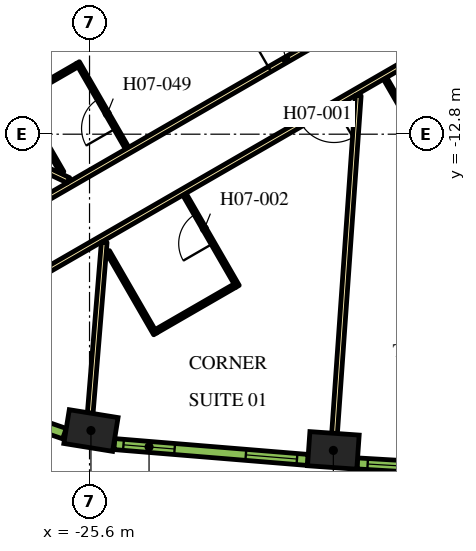
"""IFC4 building model, lengths in metres.
Left out: names, types, materials, properties, quantities, classifications, styles, units other than length and angle.
Written with IfcOpenShell. Run it as: python <this file> out.ifc"""

import sys

from ifc_helpers import new_model, si_unit, direction, frame, frame_2d, origin, origin_2d, place, context, subcontext, project, spatial, rectangle, extrude, element, fill, save


model = new_model("IFC4")
c1 = context("Model", 3, precision=1e-05, world=origin(), true_north=direction((0.0, 1.0)))
c2 = subcontext(c1, "Body", "Model", "MODEL_VIEW")
j1 = project(units=[si_unit("LENGTHUNIT", "METRE"), si_unit("PLANEANGLEUNIT", "RADIAN")], contexts=[c1])
p1 = place(None, origin())
s1 = spatial("IfcSite", under=j1, at=p1, CompositionType="ELEMENT")
p2 = place(p1, origin())
s2 = spatial("IfcBuilding", under=s1, at=p2, CompositionType="ELEMENT")
p3 = place(p2, frame((0.0, 0.0, 95.4)))
s3 = spatial("IfcBuildingStorey", under=s2, at=p3, CompositionType="ELEMENT", Elevation=95.4)
for number, where, z_axis, x_axis in (
    (1, (-25.563, -20.597, 0.0), (0.0, 0.0, 1.0), (0.987, -0.159, 0.0)),
    (2, (-19.184, -21.12, 0.0), (0.0, 0.0, 1.0), (0.998, -0.07, 0.0)),
):
    element("IfcColumn", number, at=place(p3, frame(where, z_axis=z_axis, x_axis=x_axis)), inside=s3, PredefinedType="COLUMN", context=c2, shape_type="SweptSolid", body=[
        extrude(rectangle(XDim=1.3, YDim=0.9, at=origin_2d()), origin(), (0.0, 0.0, 1.0), 3.9),
    ])
p4 = place(p3, frame((-28.211, -15.335, 0.0), z_axis=(0.0, 0.0, 1.0), x_axis=(0.866025884867, 0.49999916674, 0.0)))
e3 = element("IfcWall", 3, at=p4, inside=s3, PredefinedType="PARTITIONING", context=c2, shape_type="SweptSolid", body=[
    extrude(rectangle(XDim=13.543, YDim=0.15, at=frame_2d((6.772, 0.0))), origin(), (0.0, 0.0, 1.0), 2.75),
])
p5 = place(p4, frame((8.488, 0.0, 0.0)))
e4 = element("IfcOpeningElement", 4, at=p5, cuts=e3, PredefinedType="OPENING", context=c2, shape_type="SweptSolid", body=[
    extrude(rectangle(XDim=1.0, YDim=2.1, at=frame_2d((0.5, 1.05))), frame((0.0, 0.085, 0.0), z_axis=(0.0, -1.0, 0.0), x_axis=(1.0, 0.0, 0.0)), (0.0, 0.0, 1.0), 0.17),
])
p6 = place(p3, frame((-15.587, -9.952, 0.0), z_axis=(0.0, 0.0, 1.0), x_axis=(-0.866017869832, -0.500013048961, 0.0)))
e5 = element("IfcWall", 5, at=p6, inside=s3, PredefinedType="PARTITIONING", context=c2, shape_type="SweptSolid", body=[
    extrude(rectangle(XDim=13.624, YDim=0.15, at=frame_2d((6.812, 0.0))), origin(), (0.0, 0.0, 1.0), 2.75),
])
p7 = place(p6, frame((4.134, 0.0, 0.0)))
e6 = element("IfcOpeningElement", 6, at=p7, cuts=e5, PredefinedType="OPENING", context=c2, shape_type="SweptSolid", body=[
    extrude(rectangle(XDim=1.0, YDim=2.1, at=frame_2d((0.5, 1.05))), frame((0.0, 0.085, 0.0), z_axis=(0.0, -1.0, 0.0), x_axis=(1.0, 0.0, 0.0)), (0.0, 0.0, 1.0), 0.17),
])
p8 = place(p3, frame((-30.231, -12.085, 0.0), z_axis=(0.0, 0.0, 1.0), x_axis=(0.904001132572, -0.427530060122, 0.0)))
e7 = element("IfcWall", 7, at=p8, inside=s3, PredefinedType="PARTITIONING", context=c2, shape_type="SweptSolid", body=[
    extrude(rectangle(XDim=4.51, YDim=0.15, at=frame_2d((2.255, 0.0))), origin(), (0.0, 0.0, 1.0), 2.75),
])
p9 = place(p3, frame((-25.582, -20.138, 0.0), z_axis=(0.0, 0.0, 1.0), x_axis=(0.081746132986, 0.996653184283, 0.0)))
e8 = element("IfcWall", 8, at=p9, inside=s3, PredefinedType="PARTITIONING", context=c2, shape_type="SweptSolid", body=[
    extrude(rectangle(XDim=4.51, YDim=0.15, at=frame_2d((2.255, 0.0))), origin(), (0.0, 0.0, 1.0), 2.75),
])
p10 = place(p3, frame((-19.153, -20.671, 0.0), z_axis=(0.0, 0.0, 1.0), x_axis=(0.070070736723, 0.997542025107, 0.0)))
e9 = element("IfcWall", 9, at=p10, inside=s3, PredefinedType="PARTITIONING", context=c2, shape_type="SweptSolid", body=[
    extrude(rectangle(XDim=8.909, YDim=0.15, at=frame_2d((4.455, 0.0))), origin(), (0.0, 0.0, 1.0), 2.75),
])
p11 = place(p3, frame((-21.704, -16.803, 0.0), z_axis=(0.0, 0.0, 1.0), x_axis=(-0.500049511043, 0.865996816683, 0.0)))
e10 = element("IfcWall", 10, at=p11, inside=s3, PredefinedType="PARTITIONING", context=c2, shape_type="SweptSolid", body=[
    extrude(rectangle(XDim=2.8, YDim=0.1, at=frame_2d((1.4, 0.0))), origin(), (0.0, 0.0, 1.0), 2.75),
])
p12 = place(p11, frame((1.3, 0.0, 0.0)))
e11 = element("IfcOpeningElement", 11, at=p12, cuts=e10, PredefinedType="OPENING", context=c2, shape_type="SweptSolid", body=[
    extrude(rectangle(XDim=0.9, YDim=2.1, at=frame_2d((0.45, 1.05))), frame((0.0, 0.06, 0.0), z_axis=(0.0, -1.0, 0.0), x_axis=(1.0, 0.0, 0.0)), (0.0, 0.0, 1.0), 0.12),
])
p13 = place(p3, frame((-21.772, -16.785, 0.0), z_axis=(0.0, 0.0, 1.0), x_axis=(-0.866024647952, -0.500001309137, 0.0)))
e12 = element("IfcWall", 12, at=p13, inside=s3, PredefinedType="PARTITIONING", context=c2, shape_type="SweptSolid", body=[
    extrude(rectangle(XDim=2.4, YDim=0.1, at=frame_2d((1.2, 0.0))), origin(), (0.0, 0.0, 1.0), 2.75),
])
p14 = place(p3, frame((-25.119, -15.888, 0.0), z_axis=(0.0, 0.0, 1.0), x_axis=(0.500046524342, -0.865998541277, 0.0)))
e13 = element("IfcWall", 13, at=p14, inside=s3, PredefinedType="PARTITIONING", context=c2, shape_type="SweptSolid", body=[
    extrude(rectangle(XDim=2.5, YDim=0.1, at=frame_2d((1.25, 0.0))), origin(), (0.0, 0.0, 1.0), 2.75),
])
p15 = place(p3, frame((-16.956, -12.832, 0.0), z_axis=(0.0, 0.0, 1.0), x_axis=(-0.499978980201, 0.866037539231, 0.0)))
e14 = element("IfcWall", 14, at=p15, inside=s3, PredefinedType="PARTITIONING", context=c2, shape_type="SweptSolid", body=[
    extrude(rectangle(XDim=1.73, YDim=0.1, at=frame_2d((0.865, 0.0))), origin(), (0.0, 0.0, 1.0), 2.75),
])
p16 = place(p3, frame((-24.61, -13.169, 0.0), z_axis=(0.0, 0.0, 1.0), x_axis=(-0.500006934395, 0.866021400173, 0.0)))
e15 = element("IfcWall", 15, at=p16, inside=s3, PredefinedType="PARTITIONING", context=c2, shape_type="SweptSolid", body=[
    extrude(rectangle(XDim=2.6, YDim=0.1, at=frame_2d((1.3, 0.0))), origin(), (0.0, 0.0, 1.0), 2.75),
])
p17 = place(p16, frame((0.6, 0.0, 0.0)))
e16 = element("IfcOpeningElement", 16, at=p17, cuts=e15, PredefinedType="OPENING", context=c2, shape_type="SweptSolid", body=[
    extrude(rectangle(XDim=0.9, YDim=2.1, at=frame_2d((0.45, 1.05))), frame((0.0, 0.06, 0.0), z_axis=(0.0, -1.0, 0.0), x_axis=(1.0, 0.0, 0.0)), (0.0, 0.0, 1.0), 0.12),
])
p18 = place(p3, frame((-25.928, -10.986, 0.0), z_axis=(0.0, 0.0, 1.0), x_axis=(-0.865989465428, -0.500062241894, 0.0)))
e17 = element("IfcWall", 17, at=p18, inside=s3, PredefinedType="PARTITIONING", context=c2, shape_type="SweptSolid", body=[
    extrude(rectangle(XDim=1.7, YDim=0.1, at=frame_2d((0.85, 0.0))), origin(), (0.0, 0.0, 1.0), 2.75),
])
p19 = place(p3, frame((-26.319, -13.81, 0.0), z_axis=(0.0, 0.0, 1.0), x_axis=(-0.499952165731, 0.866053019151, 0.0)))
e18 = element("IfcWall", 18, at=p19, inside=s3, PredefinedType="PARTITIONING", context=c2, shape_type="SweptSolid", body=[
    extrude(rectangle(XDim=2.3, YDim=0.1, at=frame_2d((1.15, 0.0))), origin(), (0.0, 0.0, 1.0), 2.75),
])
p20 = place(p3, frame((-24.946, -20.954, 0.0), z_axis=(0.0, 0.0, 1.0), x_axis=(0.99665273362, -0.081751627308, 0.0)))
e19 = element("IfcWall", 19, at=p20, inside=s3, PredefinedType="SOLIDWALL", context=c2, shape_type="SweptSolid", body=[
    extrude(rectangle(XDim=5.107, YDim=0.29, at=frame_2d((2.553, 0.0))), origin(), (0.0, 0.0, 1.0), 3.65),
])
p21 = place(p20, frame((0.24, 0.0, 0.9)))
e20 = element("IfcOpeningElement", 20, at=p21, cuts=e19, PredefinedType="OPENING", context=c2, shape_type="SweptSolid", body=[
    extrude(rectangle(XDim=1.35, YDim=2.15, at=frame_2d((0.675, 1.075))), frame((0.0, 0.155, 0.0), z_axis=(0.0, -1.0, 0.0), x_axis=(1.0, 0.0, 0.0)), (0.0, 0.0, 1.0), 0.31),
])
p22 = place(p20, frame((3.471, 0.0, 0.9)))
e21 = element("IfcOpeningElement", 21, at=p22, cuts=e19, PredefinedType="OPENING", context=c2, shape_type="SweptSolid", body=[
    extrude(rectangle(XDim=1.35, YDim=2.15, at=frame_2d((0.675, 1.075))), frame((0.0, 0.155, 0.0), z_axis=(0.0, -1.0, 0.0), x_axis=(1.0, 0.0, 0.0)), (0.0, 0.0, 1.0), 0.31),
])
p23 = place(p3, frame((-18.553, -21.463, 0.0), z_axis=(0.0, 0.0, 1.0), x_axis=(0.998290511436, -0.058447025388, 0.0)))
e22 = element("IfcWall", 22, at=p23, inside=s3, PredefinedType="SOLIDWALL", context=c2, shape_type="SweptSolid", body=[
    extrude(rectangle(XDim=5.1, YDim=0.29, at=frame_2d((2.55, 0.0))), origin(), (0.0, 0.0, 1.0), 3.65),
])
p24 = place(p23, frame((0.273, 0.0, 0.9)))
e23 = element("IfcOpeningElement", 23, at=p24, cuts=e22, PredefinedType="OPENING", context=c2, shape_type="SweptSolid", body=[
    extrude(rectangle(XDim=1.35, YDim=2.15, at=frame_2d((0.675, 1.075))), frame((0.0, 0.155, 0.0), z_axis=(0.0, -1.0, 0.0), x_axis=(1.0, 0.0, 0.0)), (0.0, 0.0, 1.0), 0.31),
])
p25 = place(p23, frame((3.478, 0.0, 0.9)))
e24 = element("IfcOpeningElement", 24, at=p25, cuts=e22, PredefinedType="OPENING", context=c2, shape_type="SweptSolid", body=[
    extrude(rectangle(XDim=1.35, YDim=2.15, at=frame_2d((0.675, 1.075))), frame((0.0, 0.155, 0.0), z_axis=(0.0, -1.0, 0.0), x_axis=(1.0, 0.0, 0.0)), (0.0, 0.0, 1.0), 0.31),
])
p26 = place(p3, frame((-27.981, -20.086, 0.0), z_axis=(0.0, 0.0, 1.0), x_axis=(0.945385815453, -0.325953462844, 0.0)))
e25 = element("IfcWall", 25, at=p26, inside=s3, PredefinedType="SOLIDWALL", context=c2, shape_type="SweptSolid", body=[
    extrude(rectangle(XDim=1.819, YDim=0.29, at=frame_2d((0.91, 0.0))), origin(), (0.0, 0.0, 1.0), 3.65),
])
p27 = place(p26, frame((0.46, 0.0, 0.9)))
e26 = element("IfcOpeningElement", 26, at=p27, cuts=e25, PredefinedType="OPENING", context=c2, shape_type="SweptSolid", body=[
    extrude(rectangle(XDim=0.9, YDim=2.15, at=frame_2d((0.45, 1.075))), frame((0.0, 0.155, 0.0), z_axis=(0.0, -1.0, 0.0), x_axis=(1.0, 0.0, 0.0)), (0.0, 0.0, 1.0), 0.31),
])
p28 = place(p7, origin())
e27 = element("IfcDoor", 27, at=p28, inside=s3, OperationType="SINGLE_SWING_LEFT", PredefinedType="DOOR", context=c2, shape_type="SweptSolid", body=[
    extrude(rectangle(XDim=1.0, YDim=2.1, at=frame_2d((0.5, 1.05))), frame((0.0, 0.025, 0.0), z_axis=(0.0, -1.0, 0.0), x_axis=(1.0, 0.0, 0.0)), (0.0, 0.0, 1.0), 0.05),
])
fill(e6, e27)
p29 = place(p12, origin())
e28 = element("IfcDoor", 28, at=p29, inside=s3, OperationType="SINGLE_SWING_LEFT", PredefinedType="DOOR", context=c2, shape_type="SweptSolid", body=[
    extrude(rectangle(XDim=0.9, YDim=2.1, at=frame_2d((0.45, 1.05))), frame((0.0, 0.025, 0.0), z_axis=(0.0, -1.0, 0.0), x_axis=(1.0, 0.0, 0.0)), (0.0, 0.0, 1.0), 0.05),
])
fill(e11, e28)
p30 = place(p5, origin())
e29 = element("IfcDoor", 29, at=p30, inside=s3, OperationType="SINGLE_SWING_RIGHT", PredefinedType="DOOR", context=c2, shape_type="SweptSolid", body=[
    extrude(rectangle(XDim=1.0, YDim=2.1, at=frame_2d((0.5, 1.05))), frame((0.0, 0.025, 0.0), z_axis=(0.0, -1.0, 0.0), x_axis=(1.0, 0.0, 0.0)), (0.0, 0.0, 1.0), 0.05),
])
fill(e4, e29)
p31 = place(p17, origin())
e30 = element("IfcDoor", 30, at=p31, inside=s3, OperationType="SINGLE_SWING_LEFT", PredefinedType="DOOR", context=c2, shape_type="SweptSolid", body=[
    extrude(rectangle(XDim=0.9, YDim=2.1, at=frame_2d((0.45, 1.05))), frame((0.0, 0.025, 0.0), z_axis=(0.0, -1.0, 0.0), x_axis=(1.0, 0.0, 0.0)), (0.0, 0.0, 1.0), 0.05),
])
fill(e16, e30)
p32 = place(p21, origin())
e31 = element("IfcWindow", 31, at=p32, inside=s3, PartitioningType="DOUBLE_PANEL_VERTICAL", PredefinedType="WINDOW", context=c2, shape_type="SweptSolid", body=[
    extrude(rectangle(XDim=1.35, YDim=2.15, at=frame_2d((0.675, 1.075))), frame((0.0, 0.015, 0.0), z_axis=(0.0, -1.0, 0.0), x_axis=(1.0, 0.0, 0.0)), (0.0, 0.0, 1.0), 0.06),
])
fill(e20, e31)
p33 = place(p22, origin())
e32 = element("IfcWindow", 32, at=p33, inside=s3, PartitioningType="DOUBLE_PANEL_VERTICAL", PredefinedType="WINDOW", context=c2, shape_type="SweptSolid", body=[
    extrude(rectangle(XDim=1.35, YDim=2.15, at=frame_2d((0.675, 1.075))), frame((0.0, 0.015, 0.0), z_axis=(0.0, -1.0, 0.0), x_axis=(1.0, 0.0, 0.0)), (0.0, 0.0, 1.0), 0.06),
])
fill(e21, e32)
p34 = place(p24, origin())
e33 = element("IfcWindow", 33, at=p34, inside=s3, PartitioningType="DOUBLE_PANEL_VERTICAL", PredefinedType="WINDOW", context=c2, shape_type="SweptSolid", body=[
    extrude(rectangle(XDim=1.35, YDim=2.15, at=frame_2d((0.675, 1.075))), frame((0.0, 0.015, 0.0), z_axis=(0.0, -1.0, 0.0), x_axis=(1.0, 0.0, 0.0)), (0.0, 0.0, 1.0), 0.06),
])
fill(e23, e33)
save(model, sys.argv[1])
